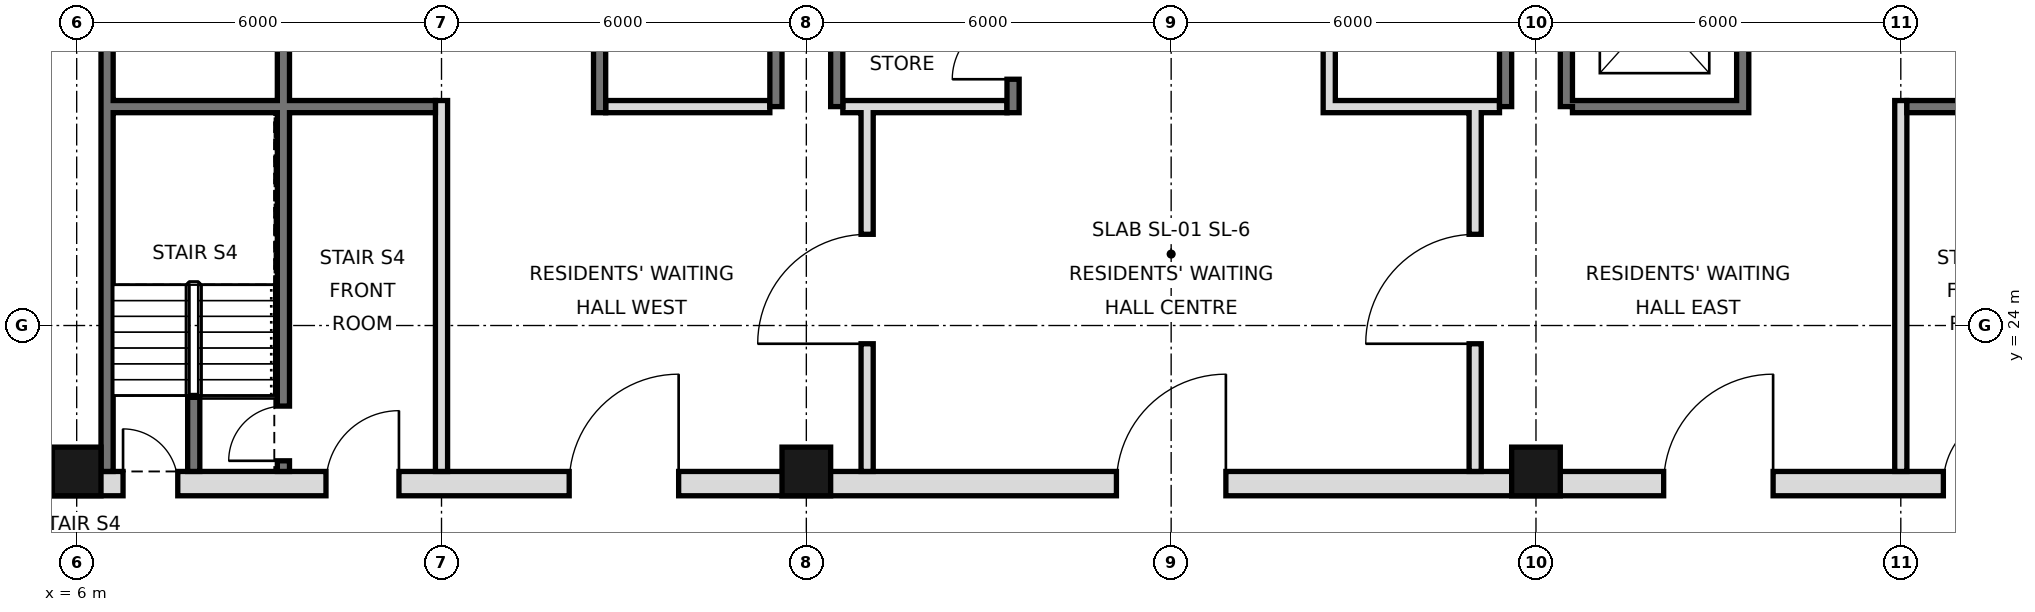
"""IFC4 building model, lengths in metres.
Left out: names, types, materials, properties, quantities, classifications, styles, units other than length and angle.
Written with IfcOpenShell. Run it as: python <this file> out.ifc"""

import sys

from ifc_helpers import new_model, si_unit, direction, frame, frame_2d, origin, origin_2d, place, context, subcontext, project, spatial, rectangle, hollow_rectangle, extrude, element, fill, save


model = new_model("IFC4")
c1 = context("Model", 3, precision=1e-05, world=origin(), true_north=direction((0.0, 1.0)))
c2 = subcontext(c1, "Body", "Model", "MODEL_VIEW")
j1 = project(units=[si_unit("LENGTHUNIT", "METRE"), si_unit("PLANEANGLEUNIT", "RADIAN")], contexts=[c1])
p1 = place(None, origin())
s1 = spatial("IfcSite", under=j1, at=p1, CompositionType="ELEMENT")
p2 = place(p1, origin())
s2 = spatial("IfcBuilding", under=s1, at=p2, CompositionType="ELEMENT")
p3 = place(p2, frame((0.0, 0.0, 234.2)))
s3 = spatial("IfcBuildingStorey", under=s2, at=p3, CompositionType="ELEMENT", Elevation=234.2)
for number, where, z_axis, x_axis in (
    (1, (6.0, 21.6, 0.0), (0.0, 0.0, 1.0), (1.0, 0.0, 0.0)),
    (2, (18.0, 21.6, 0.0), (0.0, 0.0, 1.0), (1.0, 0.0, 0.0)),
    (3, (30.0, 21.6, 0.0), (0.0, 0.0, 1.0), (1.0, 0.0, 0.0)),
):
    element("IfcColumn", number, at=place(p3, frame(where, z_axis=z_axis, x_axis=x_axis)), inside=s3, PredefinedType="COLUMN", context=c2, shape_type="SweptSolid", body=[
        extrude(hollow_rectangle(XDim=0.8, YDim=0.8, WallThickness=0.04, at=origin_2d()), origin(), (0.0, 0.0, 1.0), 5.4),
    ])
p4 = place(p3, frame((6.5, 21.6, 0.0), z_axis=(0.0, 0.0, 1.0), x_axis=(0.0, 1.0, 0.0)))
e4 = element("IfcWall", 4, at=p4, inside=s3, PredefinedType="SOLIDWALL", context=c2, shape_type="SweptSolid", body=[
    extrude(rectangle(XDim=23.5, YDim=0.2, at=frame_2d((11.75, 0.0))), origin(), (0.0, 0.0, 1.0), 5.22),
])
for number, where, z_axis, x_axis in (
    (5, (17.5, 27.6, 0.0), (0.0, 0.0, 1.0), (0.0, 1.0, 0.0)),
    (6, (18.5, 27.6, 0.0), (0.0, 0.0, 1.0), (0.0, 1.0, 0.0)),
    (7, (29.5, 27.6, 0.0), (0.0, 0.0, 1.0), (0.0, 1.0, 0.0)),
    (8, (30.5, 27.6, 0.0), (0.0, 0.0, 1.0), (0.0, 1.0, 0.0)),
):
    element("IfcWall", number, at=place(p3, frame(where, z_axis=z_axis, x_axis=x_axis)), inside=s3, PredefinedType="SOLIDWALL", context=c2, shape_type="SweptSolid", body=[
        extrude(rectangle(XDim=17.5, YDim=0.2, at=frame_2d((8.75, 0.0))), origin(), (0.0, 0.0, 1.0), 5.22),
    ])
p5 = place(p3, frame((5.6, 21.4, 0.0), z_axis=(0.0, 0.0, 1.0), x_axis=(1.0, 0.0, 0.0)))
e9 = element("IfcWall", 9, at=p5, inside=s3, PredefinedType="SOLIDWALL", context=c2, shape_type="SweptSolid", body=[
    extrude(rectangle(XDim=36.8, YDim=0.4, at=frame_2d((18.4, 0.0))), origin(), (0.0, 0.0, 1.0), 5.22),
])
p6 = place(p5, frame((8.5, 0.0, 0.0)))
e10 = element("IfcOpeningElement", 10, at=p6, cuts=e9, PredefinedType="OPENING", context=c2, shape_type="SweptSolid", body=[
    extrude(rectangle(XDim=1.8, YDim=2.1, at=frame_2d((0.9, 1.05))), frame((0.0, 0.21, 0.0), z_axis=(0.0, -1.0, 0.0), x_axis=(1.0, 0.0, 0.0)), (0.0, 0.0, 1.0), 0.42),
])
p7 = place(p5, frame((17.5, 0.0, 0.0)))
e11 = element("IfcOpeningElement", 11, at=p7, cuts=e9, PredefinedType="OPENING", context=c2, shape_type="SweptSolid", body=[
    extrude(rectangle(XDim=1.8, YDim=2.1, at=frame_2d((0.9, 1.05))), frame((0.0, 0.21, 0.0), z_axis=(0.0, -1.0, 0.0), x_axis=(1.0, 0.0, 0.0)), (0.0, 0.0, 1.0), 0.42),
])
p8 = place(p5, frame((26.5, 0.0, 0.0)))
e12 = element("IfcOpeningElement", 12, at=p8, cuts=e9, PredefinedType="OPENING", context=c2, shape_type="SweptSolid", body=[
    extrude(rectangle(XDim=1.8, YDim=2.1, at=frame_2d((0.9, 1.05))), frame((0.0, 0.21, 0.0), z_axis=(0.0, -1.0, 0.0), x_axis=(1.0, 0.0, 0.0)), (0.0, 0.0, 1.0), 0.42),
])
p9 = place(p5, frame((4.5, 0.0, 0.0)))
e13 = element("IfcOpeningElement", 13, at=p9, cuts=e9, PredefinedType="OPENING", context=c2, shape_type="SweptSolid", body=[
    extrude(rectangle(XDim=1.2, YDim=2.1, at=frame_2d((0.6, 1.05))), frame((0.0, 0.21, 0.0), z_axis=(0.0, -1.0, 0.0), x_axis=(1.0, 0.0, 0.0)), (0.0, 0.0, 1.0), 0.42),
])
p10 = place(p5, frame((31.1, 0.0, 0.0)))
e14 = element("IfcOpeningElement", 14, at=p10, cuts=e9, PredefinedType="OPENING", context=c2, shape_type="SweptSolid", body=[
    extrude(rectangle(XDim=1.2, YDim=2.1, at=frame_2d((0.6, 1.05))), frame((0.0, 0.21, 0.0), z_axis=(0.0, -1.0, 0.0), x_axis=(1.0, 0.0, 0.0)), (0.0, 0.0, 1.0), 0.42),
])
p11 = place(p5, frame((1.163, 0.0, 0.0)))
e15 = element("IfcOpeningElement", 15, at=p11, cuts=e9, PredefinedType="OPENING", context=c2, shape_type="SweptSolid", body=[
    extrude(rectangle(XDim=0.9, YDim=2.1, at=frame_2d((0.45, 1.05))), frame((0.0, 0.21, 0.0), z_axis=(0.0, -1.0, 0.0), x_axis=(1.0, 0.0, 0.0)), (0.0, 0.0, 1.0), 0.42),
])
p12 = place(p5, frame((34.738, 0.0, 0.0)))
e16 = element("IfcOpeningElement", 16, at=p12, cuts=e9, PredefinedType="OPENING", context=c2, shape_type="SweptSolid", body=[
    extrude(rectangle(XDim=0.9, YDim=2.1, at=frame_2d((0.45, 1.05))), frame((0.0, 0.21, 0.0), z_axis=(0.0, -1.0, 0.0), x_axis=(1.0, 0.0, 0.0)), (0.0, 0.0, 1.0), 0.42),
])
p13 = place(p3, frame((19.0, 21.6, 0.0), z_axis=(0.0, 0.0, 1.0), x_axis=(0.0, 1.0, 0.0)))
e17 = element("IfcWall", 17, at=p13, inside=s3, PredefinedType="PARTITIONING", context=c2, shape_type="SweptSolid", body=[
    extrude(rectangle(XDim=6.0, YDim=0.2, at=frame_2d((3.0, 0.0))), origin(), (0.0, 0.0, 1.0), 5.22),
])
p14 = place(p13, frame((2.1, 0.0, 0.0)))
e18 = element("IfcOpeningElement", 18, at=p14, cuts=e17, PredefinedType="OPENING", context=c2, shape_type="SweptSolid", body=[
    extrude(rectangle(XDim=1.8, YDim=2.1, at=frame_2d((0.9, 1.05))), frame((0.0, 0.11, 0.0), z_axis=(0.0, -1.0, 0.0), x_axis=(1.0, 0.0, 0.0)), (0.0, 0.0, 1.0), 0.22),
])
p15 = place(p3, frame((29.0, 21.6, 0.0), z_axis=(0.0, 0.0, 1.0), x_axis=(0.0, 1.0, 0.0)))
e19 = element("IfcWall", 19, at=p15, inside=s3, PredefinedType="PARTITIONING", context=c2, shape_type="SweptSolid", body=[
    extrude(rectangle(XDim=6.0, YDim=0.2, at=frame_2d((3.0, 0.0))), origin(), (0.0, 0.0, 1.0), 5.22),
])
p16 = place(p15, frame((2.1, 0.0, 0.0)))
e20 = element("IfcOpeningElement", 20, at=p16, cuts=e19, PredefinedType="OPENING", context=c2, shape_type="SweptSolid", body=[
    extrude(rectangle(XDim=1.8, YDim=2.1, at=frame_2d((0.9, 1.05))), frame((0.0, 0.11, 0.0), z_axis=(0.0, -1.0, 0.0), x_axis=(1.0, 0.0, 0.0)), (0.0, 0.0, 1.0), 0.22),
])
p17 = place(p3, frame((12.0, 21.6, 0.0), z_axis=(0.0, 0.0, 1.0), x_axis=(0.0, 1.0, 0.0)))
e21 = element("IfcWall", 21, at=p17, inside=s3, PredefinedType="PARTITIONING", context=c2, shape_type="SweptSolid", body=[
    extrude(rectangle(XDim=6.1, YDim=0.2, at=frame_2d((3.05, 0.0))), origin(), (0.0, 0.0, 1.0), 5.22),
])
p18 = place(p3, frame((14.6, 27.5, 0.0), z_axis=(0.0, 0.0, 1.0), x_axis=(0.0, 1.0, 0.0)))
e22 = element("IfcWall", 22, at=p18, inside=s3, PredefinedType="SOLIDWALL", context=c2, shape_type="SweptSolid", body=[
    extrude(rectangle(XDim=17.5, YDim=0.2, at=frame_2d((8.75, 0.0))), origin(), (0.0, 0.0, 1.0), 5.22),
])
p19 = place(p18, frame((15.4, 0.0, 0.0)))
e23 = element("IfcOpeningElement", 23, at=p19, cuts=e22, PredefinedType="OPENING", context=c2, shape_type="SweptSolid", body=[
    extrude(rectangle(XDim=1.1, YDim=2.1, at=frame_2d((0.55, 1.05))), frame((0.0, 0.11, 0.0), z_axis=(0.0, -1.0, 0.0), x_axis=(1.0, 0.0, 0.0)), (0.0, 0.0, 1.0), 0.22),
])
p20 = place(p18, frame((2.7, 0.0, 0.0)))
e24 = element("IfcOpeningElement", 24, at=p20, cuts=e22, PredefinedType="OPENING", context=c2, shape_type="SweptSolid", body=[
    extrude(rectangle(XDim=1.0, YDim=2.1, at=frame_2d((0.5, 1.05))), frame((0.0, 0.11, 0.0), z_axis=(0.0, -1.0, 0.0), x_axis=(1.0, 0.0, 0.0)), (0.0, 0.0, 1.0), 0.22),
])
p21 = place(p18, frame((9.9, 0.0, 0.0)))
e25 = element("IfcOpeningElement", 25, at=p21, cuts=e22, PredefinedType="OPENING", context=c2, shape_type="SweptSolid", body=[
    extrude(rectangle(XDim=0.9, YDim=2.1, at=frame_2d((0.45, 1.05))), frame((0.0, 0.11, 0.0), z_axis=(0.0, -1.0, 0.0), x_axis=(1.0, 0.0, 0.0)), (0.0, 0.0, 1.0), 0.22),
])
p22 = place(p3, frame((21.4, 27.5, 0.0), z_axis=(0.0, 0.0, 1.0), x_axis=(0.0, 1.0, 0.0)))
e26 = element("IfcWall", 26, at=p22, inside=s3, PredefinedType="SOLIDWALL", context=c2, shape_type="SweptSolid", body=[
    extrude(rectangle(XDim=17.5, YDim=0.2, at=frame_2d((8.75, 0.0))), origin(), (0.0, 0.0, 1.0), 5.22),
])
p23 = place(p22, frame((0.55, 0.0, 0.0)))
e27 = element("IfcOpeningElement", 27, at=p23, cuts=e26, PredefinedType="OPENING", context=c2, shape_type="SweptSolid", body=[
    extrude(rectangle(XDim=1.0, YDim=2.1, at=frame_2d((0.5, 1.05))), frame((0.0, 0.11, 0.0), z_axis=(0.0, -1.0, 0.0), x_axis=(1.0, 0.0, 0.0)), (0.0, 0.0, 1.0), 0.22),
])
p24 = place(p22, frame((3.65, 0.0, 0.0)))
e28 = element("IfcOpeningElement", 28, at=p24, cuts=e26, PredefinedType="OPENING", context=c2, shape_type="SweptSolid", body=[
    extrude(rectangle(XDim=1.0, YDim=2.1, at=frame_2d((0.5, 1.05))), frame((0.0, 0.11, 0.0), z_axis=(0.0, -1.0, 0.0), x_axis=(1.0, 0.0, 0.0)), (0.0, 0.0, 1.0), 0.22),
])
p25 = place(p22, frame((16.2, 0.0, 0.0)))
e29 = element("IfcOpeningElement", 29, at=p25, cuts=e26, PredefinedType="OPENING", context=c2, shape_type="SweptSolid", body=[
    extrude(rectangle(XDim=1.0, YDim=2.1, at=frame_2d((0.5, 1.05))), frame((0.0, 0.11, 0.0), z_axis=(0.0, -1.0, 0.0), x_axis=(1.0, 0.0, 0.0)), (0.0, 0.0, 1.0), 0.22),
])
p26 = place(p22, frame((9.8, 0.0, 0.0)))
e30 = element("IfcOpeningElement", 30, at=p26, cuts=e26, PredefinedType="OPENING", context=c2, shape_type="SweptSolid", body=[
    extrude(rectangle(XDim=1.0, YDim=2.1, at=frame_2d((0.5, 1.05))), frame((0.0, 0.11, 0.0), z_axis=(0.0, -1.0, 0.0), x_axis=(1.0, 0.0, 0.0)), (0.0, 0.0, 1.0), 0.22),
])
p27 = place(p22, frame((7.4, 0.0, 0.0)))
e31 = element("IfcOpeningElement", 31, at=p27, cuts=e26, PredefinedType="OPENING", context=c2, shape_type="SweptSolid", body=[
    extrude(rectangle(XDim=0.9, YDim=2.1, at=frame_2d((0.45, 1.05))), frame((0.0, 0.11, 0.0), z_axis=(0.0, -1.0, 0.0), x_axis=(1.0, 0.0, 0.0)), (0.0, 0.0, 1.0), 0.22),
])
p28 = place(p3, frame((26.6, 27.5, 0.0), z_axis=(0.0, 0.0, 1.0), x_axis=(0.0, 1.0, 0.0)))
e32 = element("IfcWall", 32, at=p28, inside=s3, PredefinedType="SOLIDWALL", context=c2, shape_type="SweptSolid", body=[
    extrude(rectangle(XDim=17.5, YDim=0.2, at=frame_2d((8.75, 0.0))), origin(), (0.0, 0.0, 1.0), 5.22),
])
p29 = place(p28, frame((4.3, 0.0, 0.0)))
e33 = element("IfcOpeningElement", 33, at=p29, cuts=e32, PredefinedType="OPENING", context=c2, shape_type="SweptSolid", body=[
    extrude(rectangle(XDim=0.9, YDim=2.1, at=frame_2d((0.45, 1.05))), frame((0.0, 0.11, 0.0), z_axis=(0.0, -1.0, 0.0), x_axis=(1.0, 0.0, 0.0)), (0.0, 0.0, 1.0), 0.22),
])
p30 = place(p28, frame((10.35, 0.0, 0.0)))
e34 = element("IfcOpeningElement", 34, at=p30, cuts=e32, PredefinedType="OPENING", context=c2, shape_type="SweptSolid", body=[
    extrude(rectangle(XDim=1.0, YDim=2.1, at=frame_2d((0.5, 1.05))), frame((0.0, 0.11, 0.0), z_axis=(0.0, -1.0, 0.0), x_axis=(1.0, 0.0, 0.0)), (0.0, 0.0, 1.0), 0.22),
])
p31 = place(p28, frame((15.475, 0.0, 0.0)))
e35 = element("IfcOpeningElement", 35, at=p31, cuts=e32, PredefinedType="OPENING", context=c2, shape_type="SweptSolid", body=[
    extrude(rectangle(XDim=1.0, YDim=2.1, at=frame_2d((0.5, 1.05))), frame((0.0, 0.11, 0.0), z_axis=(0.0, -1.0, 0.0), x_axis=(1.0, 0.0, 0.0)), (0.0, 0.0, 1.0), 0.22),
])
p32 = place(p3, frame((33.4, 27.5, 0.0), z_axis=(0.0, 0.0, 1.0), x_axis=(0.0, 1.0, 0.0)))
e36 = element("IfcWall", 36, at=p32, inside=s3, PredefinedType="SOLIDWALL", context=c2, shape_type="SweptSolid", body=[
    extrude(rectangle(XDim=17.5, YDim=0.2, at=frame_2d((8.75, 0.0))), origin(), (0.0, 0.0, 1.0), 5.22),
])
p33 = place(p32, frame((1.1, 0.0, 0.0)))
e37 = element("IfcOpeningElement", 37, at=p33, cuts=e36, PredefinedType="OPENING", context=c2, shape_type="SweptSolid", body=[
    extrude(rectangle(XDim=1.1, YDim=2.1, at=frame_2d((0.55, 1.05))), frame((0.0, 0.11, 0.0), z_axis=(0.0, -1.0, 0.0), x_axis=(1.0, 0.0, 0.0)), (0.0, 0.0, 1.0), 0.22),
])
p34 = place(p32, frame((4.2, 0.0, 0.0)))
e38 = element("IfcOpeningElement", 38, at=p34, cuts=e36, PredefinedType="OPENING", context=c2, shape_type="SweptSolid", body=[
    extrude(rectangle(XDim=1.1, YDim=2.1, at=frame_2d((0.55, 1.05))), frame((0.0, 0.11, 0.0), z_axis=(0.0, -1.0, 0.0), x_axis=(1.0, 0.0, 0.0)), (0.0, 0.0, 1.0), 0.22),
])
p35 = place(p32, frame((15.4, 0.0, 0.0)))
e39 = element("IfcOpeningElement", 39, at=p35, cuts=e36, PredefinedType="OPENING", context=c2, shape_type="SweptSolid", body=[
    extrude(rectangle(XDim=1.1, YDim=2.1, at=frame_2d((0.55, 1.05))), frame((0.0, 0.11, 0.0), z_axis=(0.0, -1.0, 0.0), x_axis=(1.0, 0.0, 0.0)), (0.0, 0.0, 1.0), 0.22),
])
p36 = place(p32, frame((9.9, 0.0, 0.0)))
e40 = element("IfcOpeningElement", 40, at=p36, cuts=e36, PredefinedType="OPENING", context=c2, shape_type="SweptSolid", body=[
    extrude(rectangle(XDim=0.9, YDim=2.1, at=frame_2d((0.45, 1.05))), frame((0.0, 0.11, 0.0), z_axis=(0.0, -1.0, 0.0), x_axis=(1.0, 0.0, 0.0)), (0.0, 0.0, 1.0), 0.22),
])
p37 = place(p3, frame((36.0, 21.6, 0.0), z_axis=(0.0, 0.0, 1.0), x_axis=(0.0, 1.0, 0.0)))
e41 = element("IfcWall", 41, at=p37, inside=s3, PredefinedType="PARTITIONING", context=c2, shape_type="SweptSolid", body=[
    extrude(rectangle(XDim=6.1, YDim=0.2, at=frame_2d((3.05, 0.0))), origin(), (0.0, 0.0, 1.0), 5.22),
])
p38 = place(p3, frame((7.925, 21.6, 0.0), z_axis=(0.0, 0.0, 1.0), x_axis=(0.0, 1.0, 0.0)))
e42 = element("IfcWall", 42, at=p38, inside=s3, PredefinedType="SOLIDWALL", context=c2, shape_type="SweptSolid", body=[
    extrude(rectangle(XDim=1.25, YDim=0.2, at=frame_2d((0.625, 0.0))), origin(), (0.0, 0.0, 1.0), 5.22),
])
p39 = place(p3, frame((9.4, 21.6, 0.0), z_axis=(0.0, 0.0, 1.0), x_axis=(0.0, 1.0, 0.0)))
e43 = element("IfcWall", 43, at=p39, inside=s3, PredefinedType="SOLIDWALL", context=c2, shape_type="SweptSolid", body=[
    extrude(rectangle(XDim=23.4, YDim=0.2, at=frame_2d((11.7, 0.0))), origin(), (0.0, 0.0, 1.0), 5.22),
])
p40 = place(p39, frame((7.8, 0.0, 0.0)))
e44 = element("IfcOpeningElement", 44, at=p40, cuts=e43, PredefinedType="OPENING", context=c2, shape_type="SweptSolid", body=[
    extrude(rectangle(XDim=1.0, YDim=2.1, at=frame_2d((0.5, 1.05))), frame((0.0, 0.11, 0.0), z_axis=(0.0, -1.0, 0.0), x_axis=(1.0, 0.0, 0.0)), (0.0, 0.0, 1.0), 0.22),
])
p41 = place(p39, frame((12.45, 0.0, 0.0)))
e45 = element("IfcOpeningElement", 45, at=p41, cuts=e43, PredefinedType="OPENING", context=c2, shape_type="SweptSolid", body=[
    extrude(rectangle(XDim=1.0, YDim=2.1, at=frame_2d((0.5, 1.05))), frame((0.0, 0.11, 0.0), z_axis=(0.0, -1.0, 0.0), x_axis=(1.0, 0.0, 0.0)), (0.0, 0.0, 1.0), 0.22),
])
p42 = place(p39, frame((22.1, 0.0, 0.0)))
e46 = element("IfcOpeningElement", 46, at=p42, cuts=e43, PredefinedType="OPENING", context=c2, shape_type="SweptSolid", body=[
    extrude(rectangle(XDim=1.0, YDim=2.1, at=frame_2d((0.5, 1.05))), frame((0.0, 0.11, 0.0), z_axis=(0.0, -1.0, 0.0), x_axis=(1.0, 0.0, 0.0)), (0.0, 0.0, 1.0), 0.22),
])
p43 = place(p39, frame((15.7, 0.0, 0.0)))
e47 = element("IfcOpeningElement", 47, at=p43, cuts=e43, PredefinedType="OPENING", context=c2, shape_type="SweptSolid", body=[
    extrude(rectangle(XDim=1.0, YDim=2.1, at=frame_2d((0.5, 1.05))), frame((0.0, 0.11, 0.0), z_axis=(0.0, -1.0, 0.0), x_axis=(1.0, 0.0, 0.0)), (0.0, 0.0, 1.0), 0.22),
])
p44 = place(p39, frame((0.175, 0.0, 0.0)))
e48 = element("IfcOpeningElement", 48, at=p44, cuts=e43, PredefinedType="OPENING", context=c2, shape_type="SweptSolid", body=[
    extrude(rectangle(XDim=0.9, YDim=2.1, at=frame_2d((0.45, 1.05))), frame((0.0, 0.11, 0.0), z_axis=(0.0, -1.0, 0.0), x_axis=(1.0, 0.0, 0.0)), (0.0, 0.0, 1.0), 0.22),
])
for number, where, z_axis, x_axis in (
    (49, (14.7, 27.6, 0.0), (0.0, 0.0, 1.0), (1.0, 0.0, 0.0)),
    (50, (18.6, 27.6, 0.0), (0.0, 0.0, 1.0), (1.0, 0.0, 0.0)),
):
    element("IfcWall", number, at=place(p3, frame(where, z_axis=z_axis, x_axis=x_axis)), inside=s3, PredefinedType="PARTITIONING", context=c2, shape_type="SweptSolid", body=[
        extrude(rectangle(XDim=2.7, YDim=0.2, at=frame_2d((1.35, 0.0))), origin(), (0.0, 0.0, 1.0), 5.22),
    ])
for number, where, z_axis, x_axis in (
    (51, (26.7, 27.6, 0.0), (0.0, 0.0, 1.0), (1.0, 0.0, 0.0)),
    (52, (30.6, 27.6, 0.0), (0.0, 0.0, 1.0), (1.0, 0.0, 0.0)),
):
    element("IfcWall", number, at=place(p3, frame(where, z_axis=z_axis, x_axis=x_axis)), inside=s3, PredefinedType="SOLIDWALL", context=c2, shape_type="SweptSolid", body=[
        extrude(rectangle(XDim=2.7, YDim=0.2, at=frame_2d((1.35, 0.0))), origin(), (0.0, 0.0, 1.0), 5.22),
    ])
for number, where, z_axis, x_axis in (
    (53, (36.1, 27.6, 0.0), (0.0, 0.0, 1.0), (1.0, 0.0, 0.0)),
    (54, (6.6, 27.6, 0.0), (0.0, 0.0, 1.0), (1.0, 0.0, 0.0)),
):
    element("IfcWall", number, at=place(p3, frame(where, z_axis=z_axis, x_axis=x_axis)), inside=s3, PredefinedType="SOLIDWALL", context=c2, shape_type="SweptSolid", body=[
        extrude(rectangle(XDim=5.3, YDim=0.2, at=frame_2d((2.65, 0.0))), origin(), (0.0, 0.0, 1.0), 5.22),
    ])
p45 = place(p6, frame((1.8, 0.0, 0.0), z_axis=(0.0, 0.0, 1.0), x_axis=(-1.0, 0.0, 0.0)))
e55 = element("IfcDoor", 55, at=p45, inside=s3, OperationType="SINGLE_SWING_LEFT", PredefinedType="DOOR", context=c2, shape_type="SweptSolid", body=[
    extrude(rectangle(XDim=1.8, YDim=2.1, at=frame_2d((0.9, 1.05))), frame((0.0, 0.025, 0.0), z_axis=(0.0, -1.0, 0.0), x_axis=(1.0, 0.0, 0.0)), (0.0, 0.0, 1.0), 0.05),
])
fill(e10, e55)
p46 = place(p14, origin())
e56 = element("IfcDoor", 56, at=p46, inside=s3, OperationType="SINGLE_SWING_LEFT", PredefinedType="DOOR", context=c2, shape_type="SweptSolid", body=[
    extrude(rectangle(XDim=1.8, YDim=2.1, at=frame_2d((0.9, 1.05))), frame((0.0, 0.025, 0.0), z_axis=(0.0, -1.0, 0.0), x_axis=(1.0, 0.0, 0.0)), (0.0, 0.0, 1.0), 0.05),
])
fill(e18, e56)
p47 = place(p7, frame((1.8, 0.0, 0.0), z_axis=(0.0, 0.0, 1.0), x_axis=(-1.0, 0.0, 0.0)))
e57 = element("IfcDoor", 57, at=p47, inside=s3, OperationType="SINGLE_SWING_LEFT", PredefinedType="DOOR", context=c2, shape_type="SweptSolid", body=[
    extrude(rectangle(XDim=1.8, YDim=2.1, at=frame_2d((0.9, 1.05))), frame((0.0, 0.025, 0.0), z_axis=(0.0, -1.0, 0.0), x_axis=(1.0, 0.0, 0.0)), (0.0, 0.0, 1.0), 0.05),
])
fill(e11, e57)
p48 = place(p16, origin())
e58 = element("IfcDoor", 58, at=p48, inside=s3, OperationType="SINGLE_SWING_LEFT", PredefinedType="DOOR", context=c2, shape_type="SweptSolid", body=[
    extrude(rectangle(XDim=1.8, YDim=2.1, at=frame_2d((0.9, 1.05))), frame((0.0, 0.025, 0.0), z_axis=(0.0, -1.0, 0.0), x_axis=(1.0, 0.0, 0.0)), (0.0, 0.0, 1.0), 0.05),
])
fill(e20, e58)
p49 = place(p8, frame((1.8, 0.0, 0.0), z_axis=(0.0, 0.0, 1.0), x_axis=(-1.0, 0.0, 0.0)))
e59 = element("IfcDoor", 59, at=p49, inside=s3, OperationType="SINGLE_SWING_LEFT", PredefinedType="DOOR", context=c2, shape_type="SweptSolid", body=[
    extrude(rectangle(XDim=1.8, YDim=2.1, at=frame_2d((0.9, 1.05))), frame((0.0, 0.025, 0.0), z_axis=(0.0, -1.0, 0.0), x_axis=(1.0, 0.0, 0.0)), (0.0, 0.0, 1.0), 0.05),
])
fill(e12, e59)
p50 = place(p9, frame((1.2, 0.0, 0.0), z_axis=(0.0, 0.0, 1.0), x_axis=(-1.0, 0.0, 0.0)))
e60 = element("IfcDoor", 60, at=p50, inside=s3, OperationType="SINGLE_SWING_LEFT", PredefinedType="DOOR", context=c2, shape_type="SweptSolid", body=[
    extrude(rectangle(XDim=1.2, YDim=2.1, at=frame_2d((0.6, 1.05))), frame((0.0, 0.025, 0.0), z_axis=(0.0, -1.0, 0.0), x_axis=(1.0, 0.0, 0.0)), (0.0, 0.0, 1.0), 0.05),
])
fill(e13, e60)
p51 = place(p10, frame((1.2, 0.0, 0.0), z_axis=(0.0, 0.0, 1.0), x_axis=(-1.0, 0.0, 0.0)))
e61 = element("IfcDoor", 61, at=p51, inside=s3, OperationType="SINGLE_SWING_LEFT", PredefinedType="DOOR", context=c2, shape_type="SweptSolid", body=[
    extrude(rectangle(XDim=1.2, YDim=2.1, at=frame_2d((0.6, 1.05))), frame((0.0, 0.025, 0.0), z_axis=(0.0, -1.0, 0.0), x_axis=(1.0, 0.0, 0.0)), (0.0, 0.0, 1.0), 0.05),
])
fill(e14, e61)
p52 = place(p23, origin())
e62 = element("IfcDoor", 62, at=p52, inside=s3, OperationType="SINGLE_SWING_LEFT", PredefinedType="DOOR", context=c2, shape_type="SweptSolid", body=[
    extrude(rectangle(XDim=1.0, YDim=2.1, at=frame_2d((0.5, 1.05))), frame((0.0, 0.025, 0.0), z_axis=(0.0, -1.0, 0.0), x_axis=(1.0, 0.0, 0.0)), (0.0, 0.0, 1.0), 0.05),
])
fill(e27, e62)
p53 = place(p11, origin())
e63 = element("IfcDoor", 63, at=p53, inside=s3, OperationType="SINGLE_SWING_LEFT", PredefinedType="DOOR", context=c2, shape_type="SweptSolid", body=[
    extrude(rectangle(XDim=0.9, YDim=2.1, at=frame_2d((0.45, 1.05))), frame((0.0, 0.025, 0.0), z_axis=(0.0, -1.0, 0.0), x_axis=(1.0, 0.0, 0.0)), (0.0, 0.0, 1.0), 0.05),
])
fill(e15, e63)
p54 = place(p44, origin())
e64 = element("IfcDoor", 64, at=p54, inside=s3, OperationType="SINGLE_SWING_LEFT", PredefinedType="DOOR", context=c2, shape_type="SweptSolid", body=[
    extrude(rectangle(XDim=0.9, YDim=2.1, at=frame_2d((0.45, 1.05))), frame((0.0, 0.025, 0.0), z_axis=(0.0, -1.0, 0.0), x_axis=(1.0, 0.0, 0.0)), (0.0, 0.0, 1.0), 0.05),
])
fill(e48, e64)
save(model, sys.argv[1])
